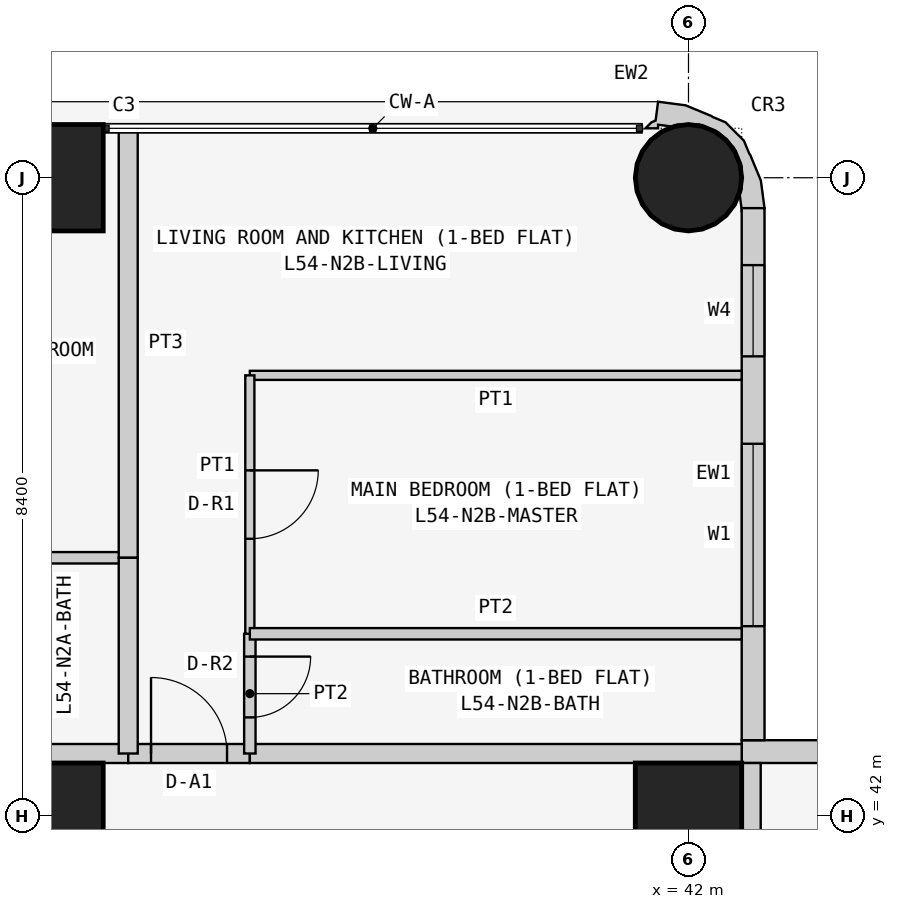
"""IFC4 building model, lengths in metres.
Left out: names, types, materials, properties, quantities, classifications, styles, units other than length and angle.
Written with IfcOpenShell. Run it as: python <this file> out.ifc"""

import sys

from ifc_helpers import new_model, si_unit, direction, frame, frame_2d, origin, origin_2d, place, context, subcontext, project, spatial, polyline, rectangle, circle, outline, extrude, element, fill, save


model = new_model("IFC4")
c1 = context("Model", 3, precision=1e-05, world=origin(), true_north=direction((0.0, 1.0)))
c2 = subcontext(c1, "Body", "Model", "MODEL_VIEW")
j1 = project(units=[si_unit("LENGTHUNIT", "METRE"), si_unit("PLANEANGLEUNIT", "RADIAN")], contexts=[c1])
p1 = place(None, origin())
s1 = spatial("IfcSite", under=j1, at=p1, CompositionType="ELEMENT")
p2 = place(p1, origin())
s2 = spatial("IfcBuilding", under=s1, at=p2, CompositionType="ELEMENT")
p3 = place(p2, frame((0.0, 0.0, 208.5)))
s3 = spatial("IfcBuildingStorey", under=s2, at=p3, CompositionType="ELEMENT", Elevation=208.5)
for number, where, z_axis, x_axis in (
    (1, (33.6, 42.0, 0.0), (0.0, 0.0, 1.0), (1.0, 0.0, 0.0)),
    (2, (33.6, 50.4, 0.0), (0.0, 0.0, 1.0), (1.0, 0.0, 0.0)),
    (3, (42.0, 42.0, 0.0), (0.0, 0.0, 1.0), (1.0, 0.0, 0.0)),
):
    element("IfcColumn", number, at=place(p3, frame(where, z_axis=z_axis, x_axis=x_axis)), inside=s3, PredefinedType="COLUMN", context=c2, shape_type="SweptSolid", body=[
        extrude(rectangle(XDim=1.4, YDim=1.4, at=origin_2d()), origin(), (0.0, 0.0, 1.0), 3.6),
    ])
p4 = place(p3, frame((42.0, 50.4, 0.0), z_axis=(0.0, 0.0, 1.0), x_axis=(1.0, 0.0, 0.0)))
e4 = element("IfcColumn", 4, at=p4, inside=s3, PredefinedType="COLUMN", context=c2, shape_type="SweptSolid", body=[
    extrude(circle(Radius=0.7, at=origin_2d()), origin(), (0.0, 0.0, 1.0), 3.6),
])
p5 = place(p3, frame((50.0, 42.85, 0.0), z_axis=(0.0, 0.0, 1.0), x_axis=(-1.0, 0.0, 0.0)))
e5 = element("IfcWall", 5, at=p5, inside=s3, PredefinedType="SOLIDWALL", context=c2, shape_type="SweptSolid", body=[
    extrude(rectangle(XDim=7.3, YDim=0.3, at=frame_2d((3.65, 0.0))), origin(), (0.0, 0.0, 1.0), 3.45),
])
p6 = place(p5, frame((3.1, 0.0, 0.9)))
e6 = element("IfcOpeningElement", 6, at=p6, cuts=e5, PredefinedType="OPENING", context=c2, shape_type="SweptSolid", body=[
    extrude(rectangle(XDim=2.4, YDim=1.5, at=frame_2d((1.2, 0.75))), frame((0.0, 0.16, 0.0), z_axis=(0.0, -1.0, 0.0), x_axis=(1.0, 0.0, 0.0)), (0.0, 0.0, 1.0), 0.32),
])
p7 = place(p5, frame((0.75, 0.0, 0.9)))
e7 = element("IfcOpeningElement", 7, at=p7, cuts=e5, PredefinedType="OPENING", context=c2, shape_type="SweptSolid", body=[
    extrude(rectangle(XDim=1.2, YDim=1.5, at=frame_2d((0.6, 0.75))), frame((0.0, 0.16, 0.0), z_axis=(0.0, -1.0, 0.0), x_axis=(1.0, 0.0, 0.0)), (0.0, 0.0, 1.0), 0.32),
])
p8 = place(p3, frame((42.85, 43.0, 0.0), z_axis=(0.0, 0.0, 1.0), x_axis=(0.0, 1.0, 0.0)))
e8 = element("IfcWall", 8, at=p8, inside=s3, PredefinedType="SOLIDWALL", context=c2, shape_type="SweptSolid", body=[
    extrude(rectangle(XDim=7.0, YDim=0.3, at=frame_2d((3.5, 0.0))), origin(), (0.0, 0.0, 1.0), 3.45),
])
p9 = place(p8, frame((1.5, 0.0, 0.9)))
e9 = element("IfcOpeningElement", 9, at=p9, cuts=e8, PredefinedType="OPENING", context=c2, shape_type="SweptSolid", body=[
    extrude(rectangle(XDim=2.4, YDim=1.5, at=frame_2d((1.2, 0.75))), frame((0.0, 0.16, 0.0), z_axis=(0.0, -1.0, 0.0), x_axis=(1.0, 0.0, 0.0)), (0.0, 0.0, 1.0), 0.32),
])
p10 = place(p8, frame((5.05, 0.0, 0.9)))
e10 = element("IfcOpeningElement", 10, at=p10, cuts=e8, PredefinedType="OPENING", context=c2, shape_type="SweptSolid", body=[
    extrude(rectangle(XDim=1.2, YDim=1.5, at=frame_2d((0.6, 0.75))), frame((0.0, 0.16, 0.0), z_axis=(0.0, -1.0, 0.0), x_axis=(1.0, 0.0, 0.0)), (0.0, 0.0, 1.0), 0.32),
])
p11 = place(p3, frame((42.724, 50.11, 0.0), z_axis=(0.0, 0.0, 1.0), x_axis=(0.439933741929, 0.898030234854, 0.0)))
e11 = element("IfcWall", 11, at=p11, inside=s3, PredefinedType="SOLIDWALL", context=c2, shape_type="SweptSolid", body=[
    extrude(outline(polyline([(-0.145, -0.044), (0.022, -0.296), (0.327, -0.094), (0.568, 0.18), (0.577, 0.199), (0.7, 0.337), (0.811, 0.661), (0.799, 0.845), (0.803, 0.866), (0.78, 1.231), (0.664, 1.577), (0.426, 1.497), (0.382, 1.536), (0.276, 1.572), (0.349, 1.423), (0.392, 1.444), (0.453, 1.261), (0.51, 1.211), (0.632, 0.961), (0.65, 0.683), (0.56, 0.419), (0.375, 0.21), (0.125, 0.087), (0.05, 0.082), (-0.127, -0.035), (-0.145, -0.044)])), origin(), (0.0, 0.0, 1.0), 3.45),
])
p12 = place(p3, frame((32.0, 42.825, 0.0), z_axis=(0.0, 0.0, 1.0), x_axis=(1.0, 0.0, 0.0)))
e12 = element("IfcWall", 12, at=p12, inside=s3, PredefinedType="PARTITIONING", context=c2, shape_type="SweptSolid", body=[
    extrude(rectangle(XDim=2.629, YDim=0.25, at=frame_2d((1.314, 0.0))), origin(), (0.0, 0.0, 1.0), 3.45),
])
p13 = place(p3, frame((34.629, 42.825, 0.0), z_axis=(0.0, 0.0, 1.0), x_axis=(1.0, 0.0, 0.0)))
e13 = element("IfcWall", 13, at=p13, inside=s3, PredefinedType="PARTITIONING", context=c2, shape_type="SweptSolid", body=[
    extrude(rectangle(XDim=1.6, YDim=0.25, at=frame_2d((0.8, 0.0))), origin(), (0.0, 0.0, 1.0), 3.45),
])
p14 = place(p13, frame((0.3, 0.0, 0.0)))
e14 = element("IfcOpeningElement", 14, at=p14, cuts=e13, PredefinedType="OPENING", context=c2, shape_type="SweptSolid", body=[
    extrude(rectangle(XDim=1.0, YDim=2.1, at=frame_2d((0.5, 1.05))), frame((0.0, 0.135, 0.0), z_axis=(0.0, -1.0, 0.0), x_axis=(1.0, 0.0, 0.0)), (0.0, 0.0, 1.0), 0.27),
])
p15 = place(p3, frame((36.229, 42.825, 0.0), z_axis=(0.0, 0.0, 1.0), x_axis=(1.0, 0.0, 0.0)))
e15 = element("IfcWall", 15, at=p15, inside=s3, PredefinedType="PARTITIONING", context=c2, shape_type="SweptSolid", body=[
    extrude(rectangle(XDim=6.471, YDim=0.25, at=frame_2d((3.235, 0.0))), origin(), (0.0, 0.0, 1.0), 3.45),
])
p16 = place(p3, frame((42.825, 42.7, 0.0), z_axis=(0.0, 0.0, 1.0), x_axis=(0.0, -1.0, 0.0)))
e16 = element("IfcWall", 16, at=p16, inside=s3, PredefinedType="PARTITIONING", context=c2, shape_type="SweptSolid", body=[
    extrude(rectangle(XDim=6.871, YDim=0.25, at=frame_2d((3.436, 0.0))), origin(), (0.0, 0.0, 1.0), 3.45),
])
p17 = place(p3, frame((34.629, 45.4, 0.0), z_axis=(0.0, 0.0, 1.0), x_axis=(-1.0, 0.0, 0.0)))
e17 = element("IfcWall", 17, at=p17, inside=s3, PredefinedType="PARTITIONING", context=c2, shape_type="SweptSolid", body=[
    extrude(rectangle(XDim=2.629, YDim=0.15, at=frame_2d((1.314, 0.0))), origin(), (0.0, 0.0, 1.0), 3.45),
])
p18 = place(p3, frame((34.629, 51.05, 0.0), z_axis=(0.0, 0.0, 1.0), x_axis=(0.0, -1.0, 0.0)))
e18 = element("IfcWall", 18, at=p18, inside=s3, PredefinedType="PARTITIONING", context=c2, shape_type="SweptSolid", body=[
    extrude(rectangle(XDim=5.65, YDim=0.25, at=frame_2d((2.825, 0.0))), origin(), (0.0, 0.0, 1.0), 3.45),
])
p19 = place(p3, frame((34.629, 45.4, 0.0), z_axis=(0.0, 0.0, 1.0), x_axis=(0.0, -1.0, 0.0)))
e19 = element("IfcWall", 19, at=p19, inside=s3, PredefinedType="PARTITIONING", context=c2, shape_type="SweptSolid", body=[
    extrude(rectangle(XDim=2.575, YDim=0.25, at=frame_2d((1.288, 0.0))), origin(), (0.0, 0.0, 1.0), 3.45),
])
p20 = place(p3, frame((36.229, 44.4, 0.0), z_axis=(0.0, 0.0, 1.0), x_axis=(0.0, -1.0, 0.0)))
e20 = element("IfcWall", 20, at=p20, inside=s3, PredefinedType="PARTITIONING", context=c2, shape_type="SweptSolid", body=[
    extrude(rectangle(XDim=1.575, YDim=0.15, at=frame_2d((0.788, 0.0))), origin(), (0.0, 0.0, 1.0), 3.45),
])
p21 = place(p20, frame((0.3, 0.0, 0.0)))
e21 = element("IfcOpeningElement", 21, at=p21, cuts=e20, PredefinedType="OPENING", context=c2, shape_type="SweptSolid", body=[
    extrude(rectangle(XDim=0.8, YDim=2.1, at=frame_2d((0.4, 1.05))), frame((0.0, 0.085, 0.0), z_axis=(0.0, -1.0, 0.0), x_axis=(1.0, 0.0, 0.0)), (0.0, 0.0, 1.0), 0.17),
])
p22 = place(p3, frame((42.7, 47.8, 0.0), z_axis=(0.0, 0.0, 1.0), x_axis=(-1.0, 0.0, 0.0)))
e22 = element("IfcWall", 22, at=p22, inside=s3, PredefinedType="PARTITIONING", context=c2, shape_type="SweptSolid", body=[
    extrude(rectangle(XDim=6.471, YDim=0.12, at=frame_2d((3.235, 0.0))), origin(), (0.0, 0.0, 1.0), 3.45),
])
p23 = place(p3, frame((36.229, 47.8, 0.0), z_axis=(0.0, 0.0, 1.0), x_axis=(0.0, -1.0, 0.0)))
e23 = element("IfcWall", 23, at=p23, inside=s3, PredefinedType="PARTITIONING", context=c2, shape_type="SweptSolid", body=[
    extrude(rectangle(XDim=3.4, YDim=0.12, at=frame_2d((1.7, 0.0))), origin(), (0.0, 0.0, 1.0), 3.45),
])
p24 = place(p23, frame((1.25, 0.0, 0.0)))
e24 = element("IfcOpeningElement", 24, at=p24, cuts=e23, PredefinedType="OPENING", context=c2, shape_type="SweptSolid", body=[
    extrude(rectangle(XDim=0.9, YDim=2.1, at=frame_2d((0.45, 1.05))), frame((0.0, 0.07, 0.0), z_axis=(0.0, -1.0, 0.0), x_axis=(1.0, 0.0, 0.0)), (0.0, 0.0, 1.0), 0.14),
])
p25 = place(p3, frame((36.229, 44.4, 0.0), z_axis=(0.0, 0.0, 1.0), x_axis=(1.0, 0.0, 0.0)))
e25 = element("IfcWall", 25, at=p25, inside=s3, PredefinedType="PARTITIONING", context=c2, shape_type="SweptSolid", body=[
    extrude(rectangle(XDim=6.471, YDim=0.15, at=frame_2d((3.235, 0.0))), origin(), (0.0, 0.0, 1.0), 3.45),
])
p26 = place(p9, origin())
e26 = element("IfcWindow", 26, at=p26, inside=s3, PartitioningType="SINGLE_PANEL", PredefinedType="WINDOW", context=c2, shape_type="SweptSolid", body=[
    extrude(rectangle(XDim=2.4, YDim=1.5, at=frame_2d((1.2, 0.75))), frame((0.0, 0.03, 0.0), z_axis=(0.0, -1.0, 0.0), x_axis=(1.0, 0.0, 0.0)), (0.0, 0.0, 1.0), 0.06),
])
fill(e9, e26)
p27 = place(p10, origin())
e27 = element("IfcWindow", 27, at=p27, inside=s3, PartitioningType="SINGLE_PANEL", PredefinedType="WINDOW", context=c2, shape_type="SweptSolid", body=[
    extrude(rectangle(XDim=1.2, YDim=1.5, at=frame_2d((0.6, 0.75))), frame((0.0, 0.03, 0.0), z_axis=(0.0, -1.0, 0.0), x_axis=(1.0, 0.0, 0.0)), (0.0, 0.0, 1.0), 0.06),
])
fill(e10, e27)
p28 = place(p14, origin())
e28 = element("IfcDoor", 28, at=p28, inside=s3, OperationType="SINGLE_SWING_LEFT", PredefinedType="DOOR", context=c2, shape_type="SweptSolid", body=[
    extrude(rectangle(XDim=1.0, YDim=2.1, at=frame_2d((0.5, 1.05))), frame((0.0, 0.025, 0.0), z_axis=(0.0, -1.0, 0.0), x_axis=(1.0, 0.0, 0.0)), (0.0, 0.0, 1.0), 0.05),
])
fill(e14, e28)
p29 = place(p21, origin())
e29 = element("IfcDoor", 29, at=p29, inside=s3, OperationType="SINGLE_SWING_LEFT", PredefinedType="DOOR", context=c2, shape_type="SweptSolid", body=[
    extrude(rectangle(XDim=0.8, YDim=2.1, at=frame_2d((0.4, 1.05))), frame((0.0, 0.025, 0.0), z_axis=(0.0, -1.0, 0.0), x_axis=(1.0, 0.0, 0.0)), (0.0, 0.0, 1.0), 0.05),
])
fill(e21, e29)
p30 = place(p24, origin())
e30 = element("IfcDoor", 30, at=p30, inside=s3, OperationType="SINGLE_SWING_LEFT", PredefinedType="DOOR", context=c2, shape_type="SweptSolid", body=[
    extrude(rectangle(XDim=0.9, YDim=2.1, at=frame_2d((0.45, 1.05))), frame((0.0, 0.025, 0.0), z_axis=(0.0, -1.0, 0.0), x_axis=(1.0, 0.0, 0.0)), (0.0, 0.0, 1.0), 0.05),
])
fill(e24, e30)
save(model, sys.argv[1])
